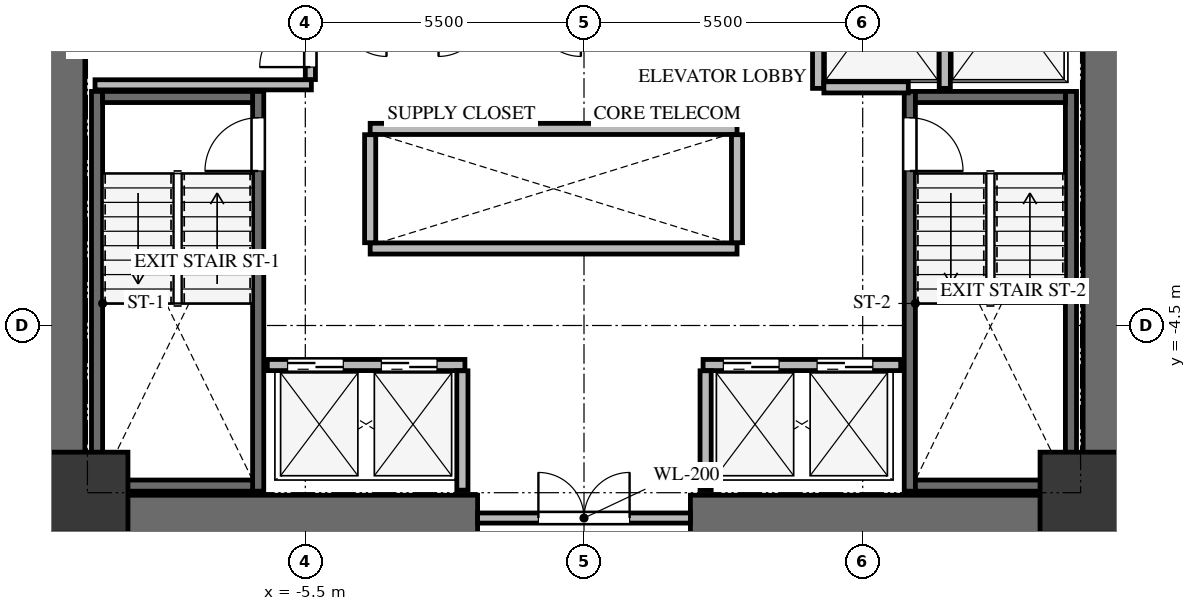
"""IFC4 building model, lengths in metres.
Left out: names, types, materials, properties, quantities, classifications, styles, units other than length and angle.
Written with IfcOpenShell. Run it as: python <this file> out.ifc"""

import sys

from ifc_helpers import new_model, si_unit, direction, frame, frame_2d, origin, origin_2d, place, context, subcontext, project, spatial, rectangle, extrude, source, transform, mapped, element, fill, save


model = new_model("IFC4")
c1 = context("Model", 3, precision=1e-05, world=origin(), true_north=direction((0.0, 1.0)))
c2 = subcontext(c1, "Body", "Model", "MODEL_VIEW")
j1 = project(units=[si_unit("LENGTHUNIT", "METRE"), si_unit("PLANEANGLEUNIT", "RADIAN")], contexts=[c1])
p1 = place(None, origin())
s1 = spatial("IfcSite", under=j1, at=p1, CompositionType="ELEMENT")
p2 = place(p1, origin())
s2 = spatial("IfcBuilding", under=s1, at=p2, CompositionType="ELEMENT")
p3 = place(p2, frame((0.0, 0.0, 65.4)))
s3 = spatial("IfcBuildingStorey", under=s2, at=p3, CompositionType="ELEMENT", Elevation=65.4)
for number, where, z_axis, x_axis in (
    (1, (-10.3, -8.75, 0.0), (0.0, 0.0, 1.0), (0.0, 1.0, 0.0)),
    (2, (10.3, -8.75, 0.0), (0.0, 0.0, 1.0), (0.0, 1.0, 0.0)),
):
    element("IfcWall", number, at=place(p3, frame(where, z_axis=z_axis, x_axis=x_axis)), inside=s3, PredefinedType="SHEAR", context=c2, shape_type="SweptSolid", body=[
        extrude(rectangle(XDim=17.5, YDim=0.9, at=frame_2d((8.75, 0.0))), origin(), (0.0, 0.0, 1.0), 3.3),
    ])
for number, where, z_axis, x_axis in (
    (3, (-9.85, -8.3, 0.0), (0.0, 0.0, 1.0), (1.0, 0.0, 0.0)),
    (4, (2.1, -8.3, 0.0), (0.0, 0.0, 1.0), (1.0, 0.0, 0.0)),
):
    element("IfcWall", number, at=place(p3, frame(where, z_axis=z_axis, x_axis=x_axis)), inside=s3, PredefinedType="SHEAR", context=c2, shape_type="SweptSolid", body=[
        extrude(rectangle(XDim=7.75, YDim=0.9, at=frame_2d((3.875, 0.0))), origin(), (0.0, 0.0, 1.0), 3.3),
    ])
p4 = place(p3, frame((-6.43, -7.77, -0.24), z_axis=(0.0, 0.0, 1.0), x_axis=(0.0, 1.0, 0.0)))
e5 = element("IfcWall", 5, at=p4, inside=s3, PredefinedType="SHEAR", context=c2, shape_type="SweptSolid", body=[
    extrude(rectangle(XDim=7.89, YDim=0.22, at=frame_2d((3.945, 0.0))), origin(), (0.0, 0.0, 1.0), 3.3),
])
p5 = place(p4, frame((6.32, 0.0, 0.0)))
e6 = element("IfcOpeningElement", 6, at=p5, cuts=e5, PredefinedType="OPENING", context=c2, shape_type="SweptSolid", body=[
    extrude(rectangle(XDim=1.05, YDim=2.15, at=frame_2d((0.525, 1.075))), frame((0.0, 0.12, 0.0), z_axis=(0.0, -1.0, 0.0), x_axis=(1.0, 0.0, 0.0)), (0.0, 0.0, 1.0), 0.24),
])
p6 = place(p3, frame((-9.61, 0.12, -0.24), z_axis=(0.0, 0.0, 1.0), x_axis=(0.0, -1.0, 0.0)))
e7 = element("IfcWall", 7, at=p6, inside=s3, PredefinedType="SHEAR", context=c2, shape_type="SweptSolid", body=[
    extrude(rectangle(XDim=7.89, YDim=0.22, at=frame_2d((3.945, 0.0))), origin(), (0.0, 0.0, 1.0), 3.3),
])
for number, where, z_axis, x_axis in (
    (8, (-9.5, -7.66, -0.24), (0.0, 0.0, 1.0), (1.0, 0.0, 0.0)),
    (9, (-6.54, 0.01, -0.24), (0.0, 0.0, 1.0), (-1.0, 0.0, 0.0)),
):
    element("IfcWall", number, at=place(p3, frame(where, z_axis=z_axis, x_axis=x_axis)), inside=s3, PredefinedType="SHEAR", context=c2, shape_type="SweptSolid", body=[
        extrude(rectangle(XDim=2.96, YDim=0.22, at=frame_2d((1.48, 0.0))), origin(), (0.0, 0.0, 1.0), 3.3),
    ])
p7 = place(p3, frame((9.61, -7.77, -0.24), z_axis=(0.0, 0.0, 1.0), x_axis=(0.0, 1.0, 0.0)))
e10 = element("IfcWall", 10, at=p7, inside=s3, PredefinedType="SHEAR", context=c2, shape_type="SweptSolid", body=[
    extrude(rectangle(XDim=7.89, YDim=0.22, at=frame_2d((3.945, 0.0))), origin(), (0.0, 0.0, 1.0), 3.3),
])
p8 = place(p3, frame((6.43, 0.12, -0.24), z_axis=(0.0, 0.0, 1.0), x_axis=(0.0, -1.0, 0.0)))
e11 = element("IfcWall", 11, at=p8, inside=s3, PredefinedType="SHEAR", context=c2, shape_type="SweptSolid", body=[
    extrude(rectangle(XDim=7.89, YDim=0.22, at=frame_2d((3.945, 0.0))), origin(), (0.0, 0.0, 1.0), 3.3),
])
p9 = place(p8, frame((0.52, 0.0, 0.0)))
e12 = element("IfcOpeningElement", 12, at=p9, cuts=e11, PredefinedType="OPENING", context=c2, shape_type="SweptSolid", body=[
    extrude(rectangle(XDim=1.05, YDim=2.15, at=frame_2d((0.525, 1.075))), frame((0.0, 0.12, 0.0), z_axis=(0.0, -1.0, 0.0), x_axis=(1.0, 0.0, 0.0)), (0.0, 0.0, 1.0), 0.24),
])
for number, where, z_axis, x_axis in (
    (13, (6.54, -7.66, -0.24), (0.0, 0.0, 1.0), (1.0, 0.0, 0.0)),
    (14, (9.5, 0.01, -0.24), (0.0, 0.0, 1.0), (-1.0, 0.0, 0.0)),
):
    element("IfcWall", number, at=place(p3, frame(where, z_axis=z_axis, x_axis=x_axis)), inside=s3, PredefinedType="SHEAR", context=c2, shape_type="SweptSolid", body=[
        extrude(rectangle(XDim=2.96, YDim=0.22, at=frame_2d((1.48, 0.0))), origin(), (0.0, 0.0, 1.0), 3.3),
    ])
m1 = source(origin(), c2, "Body", "SweptSolid", [
    extrude(rectangle(XDim=1.6, YDim=1.6, at=origin_2d()), origin(), (0.0, 0.0, 1.0), 3.3),
])
for number, where, z_axis, x_axis in (
    (15, (-9.8, -7.8, -0.24), (0.0, 0.0, 1.0), (1.0, 0.0, 0.0)),
    (16, (9.8, -7.8, -0.24), (0.0, 0.0, 1.0), (1.0, 0.0, 0.0)),
):
    element("IfcColumn", number, at=place(p3, frame(where, z_axis=z_axis, x_axis=x_axis)), inside=s3, PredefinedType="COLUMN", context=c2, shape_type="MappedRepresentation", body=[
        mapped(m1, transform((0.0, 0.0, 0.0), x_axis=(1.0, 0.0, 0.0), y_axis=(0.0, 1.0, 0.0), z_axis=(0.0, 0.0, 1.0), scale=1.0)),
    ])
p10 = place(p3, frame((-2.1, -8.3, 0.0), z_axis=(0.0, 0.0, 1.0), x_axis=(1.0, 0.0, 0.0)))
e17 = element("IfcWall", 17, at=p10, inside=s3, PredefinedType="SOLIDWALL", context=c2, shape_type="SweptSolid", body=[
    extrude(rectangle(XDim=4.2, YDim=0.2, at=frame_2d((2.1, 0.0))), origin(), (0.0, 0.0, 1.0), 3.045),
])
p11 = place(p10, frame((1.2, 0.0, 0.0)))
e18 = element("IfcOpeningElement", 18, at=p11, cuts=e17, PredefinedType="OPENING", context=c2, shape_type="SweptSolid", body=[
    extrude(rectangle(XDim=1.8, YDim=2.15, at=frame_2d((0.9, 1.075))), frame((0.0, 0.11, 0.0), z_axis=(0.0, -1.0, 0.0), x_axis=(1.0, 0.0, 0.0)), (0.0, 0.0, 1.0), 0.22),
])
p12 = place(p3, frame((-9.65, 0.25, 0.0), z_axis=(0.0, 0.0, 1.0), x_axis=(1.0, 0.0, 0.0)))
e19 = element("IfcWall", 19, at=p12, inside=s3, PredefinedType="SOLIDWALL", context=c2, shape_type="SweptSolid", body=[
    extrude(rectangle(XDim=4.27, YDim=0.2, at=frame_2d((2.135, 0.0))), origin(), (0.0, 0.0, 1.0), 3.045),
])
p13 = place(p3, frame((-5.4, 0.354, 0.0), z_axis=(0.0, 0.0, 1.0), x_axis=(0.0, 1.0, 0.0)))
e20 = element("IfcWall", 20, at=p13, inside=s3, PredefinedType="SOLIDWALL", context=c2, shape_type="SweptSolid", body=[
    extrude(rectangle(XDim=4.026, YDim=0.2, at=frame_2d((2.013, 0.0))), origin(), (0.0, 0.0, 1.0), 3.045),
])
p14 = place(p13, frame((0.246, 0.0, 0.0)))
e21 = element("IfcOpeningElement", 21, at=p14, cuts=e20, PredefinedType="OPENING", context=c2, shape_type="SweptSolid", body=[
    extrude(rectangle(XDim=1.0, YDim=2.15, at=frame_2d((0.5, 1.075))), frame((0.0, 0.11, 0.0), z_axis=(0.0, -1.0, 0.0), x_axis=(1.0, 0.0, 0.0)), (0.0, 0.0, 1.0), 0.22),
])
for number, where, z_axis, x_axis in (
    (22, (4.62, 0.18, 0.0), (0.0, 0.0, 1.0), (0.0, 1.0, 0.0)),
    (23, (7.12, 0.18, 0.0), (0.0, 0.0, 1.0), (0.0, 1.0, 0.0)),
):
    element("IfcWall", number, at=place(p3, frame(where, z_axis=z_axis, x_axis=x_axis)), inside=s3, PredefinedType="SOLIDWALL", context=c2, shape_type="SweptSolid", body=[
        extrude(rectangle(XDim=3.186, YDim=0.22, at=frame_2d((1.593, 0.0))), origin(), (0.0, 0.0, 1.0), 3.045),
    ])
p15 = place(p3, frame((4.734, 0.2, 0.0), z_axis=(0.0, 0.0, 1.0), x_axis=(1.0, 0.0, 0.0)))
e24 = element("IfcWall", 24, at=p15, inside=s3, PredefinedType="SOLIDWALL", context=c2, shape_type="SweptSolid", body=[
    extrude(rectangle(XDim=1.666, YDim=0.22, at=frame_2d((0.833, 0.0))), origin(), (0.0, 0.0, 1.0), 3.045),
])
p16 = place(p3, frame((-6.25, -5.28, 0.0), z_axis=(0.0, 0.0, 1.0), x_axis=(1.0, 0.0, 0.0)))
e25 = element("IfcWall", 25, at=p16, inside=s3, PredefinedType="SOLIDWALL", context=c2, shape_type="SweptSolid", body=[
    extrude(rectangle(XDim=3.9, YDim=0.22, at=frame_2d((1.95, 0.0))), origin(), (0.0, 0.0, 1.0), 3.045),
])
p17 = place(p16, frame((0.4, 0.0, 0.0)))
e26 = element("IfcOpeningElement", 26, at=p17, cuts=e25, PredefinedType="OPENING", context=c2, shape_type="SweptSolid", body=[
    extrude(rectangle(XDim=1.1, YDim=2.15, at=frame_2d((0.55, 1.075))), frame((0.0, 0.12, 0.0), z_axis=(0.0, -1.0, 0.0), x_axis=(1.0, 0.0, 0.0)), (0.0, 0.0, 1.0), 0.24),
])
p18 = place(p16, frame((2.25, 0.0, 0.0)))
e27 = element("IfcOpeningElement", 27, at=p18, cuts=e25, PredefinedType="OPENING", context=c2, shape_type="SweptSolid", body=[
    extrude(rectangle(XDim=1.1, YDim=2.15, at=frame_2d((0.55, 1.075))), frame((0.0, 0.12, 0.0), z_axis=(0.0, -1.0, 0.0), x_axis=(1.0, 0.0, 0.0)), (0.0, 0.0, 1.0), 0.24),
])
p19 = place(p3, frame((2.35, -5.28, 0.0), z_axis=(0.0, 0.0, 1.0), x_axis=(1.0, 0.0, 0.0)))
e28 = element("IfcWall", 28, at=p19, inside=s3, PredefinedType="SOLIDWALL", context=c2, shape_type="SweptSolid", body=[
    extrude(rectangle(XDim=3.9, YDim=0.22, at=frame_2d((1.95, 0.0))), origin(), (0.0, 0.0, 1.0), 3.045),
])
p20 = place(p19, frame((0.4, 0.0, 0.0)))
e29 = element("IfcOpeningElement", 29, at=p20, cuts=e28, PredefinedType="OPENING", context=c2, shape_type="SweptSolid", body=[
    extrude(rectangle(XDim=1.1, YDim=2.15, at=frame_2d((0.55, 1.075))), frame((0.0, 0.12, 0.0), z_axis=(0.0, -1.0, 0.0), x_axis=(1.0, 0.0, 0.0)), (0.0, 0.0, 1.0), 0.24),
])
p21 = place(p19, frame((2.25, 0.0, 0.0)))
e30 = element("IfcOpeningElement", 30, at=p21, cuts=e28, PredefinedType="OPENING", context=c2, shape_type="SweptSolid", body=[
    extrude(rectangle(XDim=1.1, YDim=2.15, at=frame_2d((0.55, 1.075))), frame((0.0, 0.12, 0.0), z_axis=(0.0, -1.0, 0.0), x_axis=(1.0, 0.0, 0.0)), (0.0, 0.0, 1.0), 0.24),
])
for number, where, z_axis, x_axis in (
    (31, (-2.4, -7.75, 0.0), (0.0, 0.0, 1.0), (0.0, 1.0, 0.0)),
    (32, (2.4, -7.75, 0.0), (0.0, 0.0, 1.0), (0.0, 1.0, 0.0)),
):
    element("IfcWall", number, at=place(p3, frame(where, z_axis=z_axis, x_axis=x_axis)), inside=s3, PredefinedType="SOLIDWALL", context=c2, shape_type="SweptSolid", body=[
        extrude(rectangle(XDim=2.356, YDim=0.22, at=frame_2d((1.178, 0.0))), origin(), (0.0, 0.0, 1.0), 3.045),
    ])
for number, where, z_axis, x_axis in (
    (33, (-4.22, -2.98, 0.0), (0.0, 0.0, 1.0), (1.0, 0.0, 0.0)),
    (34, (-4.22, -0.62, 0.0), (0.0, 0.0, 1.0), (1.0, 0.0, 0.0)),
):
    element("IfcWall", number, at=place(p3, frame(where, z_axis=z_axis, x_axis=x_axis)), inside=s3, PredefinedType="SOLIDWALL", context=c2, shape_type="SweptSolid", body=[
        extrude(rectangle(XDim=7.24, YDim=0.22, at=frame_2d((3.62, 0.0))), origin(), (0.0, 0.0, 1.0), 3.045),
    ])
for number, where, z_axis, x_axis in (
    (35, (-4.22, -2.866, 0.0), (0.0, 0.0, 1.0), (0.0, 1.0, 0.0)),
    (36, (3.02, -2.866, 0.0), (0.0, 0.0, 1.0), (0.0, 1.0, 0.0)),
):
    element("IfcWall", number, at=place(p3, frame(where, z_axis=z_axis, x_axis=x_axis)), inside=s3, PredefinedType="SOLIDWALL", context=c2, shape_type="SweptSolid", body=[
        extrude(rectangle(XDim=2.132, YDim=0.22, at=frame_2d((1.066, 0.0))), origin(), (0.0, 0.0, 1.0), 3.045),
    ])
m2 = source(origin(), c2, "Body", "SweptSolid", [
    extrude(rectangle(XDim=1.05, YDim=2.15, at=frame_2d((0.525, 1.075))), frame((0.0, 0.025, 0.0), z_axis=(0.0, -1.0, 0.0), x_axis=(1.0, 0.0, 0.0)), (0.0, 0.0, 1.0), 0.05),
])
p22 = place(p5, origin())
e37 = element("IfcDoor", 37, at=p22, inside=s3, OperationType="SINGLE_SWING_LEFT", PredefinedType="DOOR", context=c2, shape_type="MappedRepresentation", body=[
    mapped(m2, transform((0.0, 0.0, 0.0), x_axis=(1.0, 0.0, 0.0), y_axis=(0.0, 1.0, 0.0), z_axis=(0.0, 0.0, 1.0), scale=1.0)),
])
fill(e6, e37)
m3 = source(origin(), c2, "Body", "SweptSolid", [
    extrude(rectangle(XDim=1.05, YDim=2.15, at=frame_2d((0.525, 1.075))), frame((0.0, 0.025, 0.0), z_axis=(0.0, -1.0, 0.0), x_axis=(1.0, 0.0, 0.0)), (0.0, 0.0, 1.0), 0.05),
])
p23 = place(p9, origin())
e38 = element("IfcDoor", 38, at=p23, inside=s3, OperationType="SINGLE_SWING_RIGHT", PredefinedType="DOOR", context=c2, shape_type="MappedRepresentation", body=[
    mapped(m3, transform((0.0, 0.0, 0.0), x_axis=(1.0, 0.0, 0.0), y_axis=(0.0, 1.0, 0.0), z_axis=(0.0, 0.0, 1.0), scale=1.0)),
])
fill(e12, e38)
m4 = source(origin(), c2, "Body", "SweptSolid", [
    extrude(rectangle(XDim=1.8, YDim=2.15, at=frame_2d((0.9, 1.075))), frame((0.0, 0.025, 0.0), z_axis=(0.0, -1.0, 0.0), x_axis=(1.0, 0.0, 0.0)), (0.0, 0.0, 1.0), 0.05),
])
p24 = place(p11, origin())
e39 = element("IfcDoor", 39, at=p24, inside=s3, OperationType="DOUBLE_DOOR_SINGLE_SWING", PredefinedType="DOOR", context=c2, shape_type="MappedRepresentation", body=[
    mapped(m4, transform((0.0, 0.0, 0.0), x_axis=(1.0, 0.0, 0.0), y_axis=(0.0, 1.0, 0.0), z_axis=(0.0, 0.0, 1.0), scale=1.0)),
])
fill(e18, e39)
m5 = source(origin(), c2, "Body", "SweptSolid", [
    extrude(rectangle(XDim=1.0, YDim=2.15, at=frame_2d((0.5, 1.075))), frame((0.0, 0.025, 0.0), z_axis=(0.0, -1.0, 0.0), x_axis=(1.0, 0.0, 0.0)), (0.0, 0.0, 1.0), 0.05),
])
p25 = place(p14, origin())
e40 = element("IfcDoor", 40, at=p25, inside=s3, OperationType="SINGLE_SWING_LEFT", PredefinedType="DOOR", context=c2, shape_type="MappedRepresentation", body=[
    mapped(m5, transform((0.0, 0.0, 0.0), x_axis=(1.0, 0.0, 0.0), y_axis=(0.0, 1.0, 0.0), z_axis=(0.0, 0.0, 1.0), scale=1.0)),
])
fill(e21, e40)
m6 = source(origin(), c2, "Body", "SweptSolid", [
    extrude(rectangle(XDim=1.1, YDim=2.15, at=frame_2d((0.55, 1.075))), frame((0.0, 0.025, 0.0), z_axis=(0.0, -1.0, 0.0), x_axis=(1.0, 0.0, 0.0)), (0.0, 0.0, 1.0), 0.05),
])
p26 = place(p17, origin())
e41 = element("IfcDoor", 41, at=p26, inside=s3, OperationType="DOUBLE_DOOR_SLIDING", PredefinedType="DOOR", context=c2, shape_type="MappedRepresentation", body=[
    mapped(m6, transform((0.0, 0.0, 0.0), x_axis=(1.0, 0.0, 0.0), y_axis=(0.0, 1.0, 0.0), z_axis=(0.0, 0.0, 1.0), scale=1.0)),
])
fill(e26, e41)
p27 = place(p18, origin())
e42 = element("IfcDoor", 42, at=p27, inside=s3, OperationType="DOUBLE_DOOR_SLIDING", PredefinedType="DOOR", context=c2, shape_type="MappedRepresentation", body=[
    mapped(m6, transform((0.0, 0.0, 0.0), x_axis=(1.0, 0.0, 0.0), y_axis=(0.0, 1.0, 0.0), z_axis=(0.0, 0.0, 1.0), scale=1.0)),
])
fill(e27, e42)
p28 = place(p20, origin())
e43 = element("IfcDoor", 43, at=p28, inside=s3, OperationType="DOUBLE_DOOR_SLIDING", PredefinedType="DOOR", context=c2, shape_type="MappedRepresentation", body=[
    mapped(m6, transform((0.0, 0.0, 0.0), x_axis=(1.0, 0.0, 0.0), y_axis=(0.0, 1.0, 0.0), z_axis=(0.0, 0.0, 1.0), scale=1.0)),
])
fill(e29, e43)
p29 = place(p21, origin())
e44 = element("IfcDoor", 44, at=p29, inside=s3, OperationType="DOUBLE_DOOR_SLIDING", PredefinedType="DOOR", context=c2, shape_type="MappedRepresentation", body=[
    mapped(m6, transform((0.0, 0.0, 0.0), x_axis=(1.0, 0.0, 0.0), y_axis=(0.0, 1.0, 0.0), z_axis=(0.0, 0.0, 1.0), scale=1.0)),
])
fill(e30, e44)
save(model, sys.argv[1])
